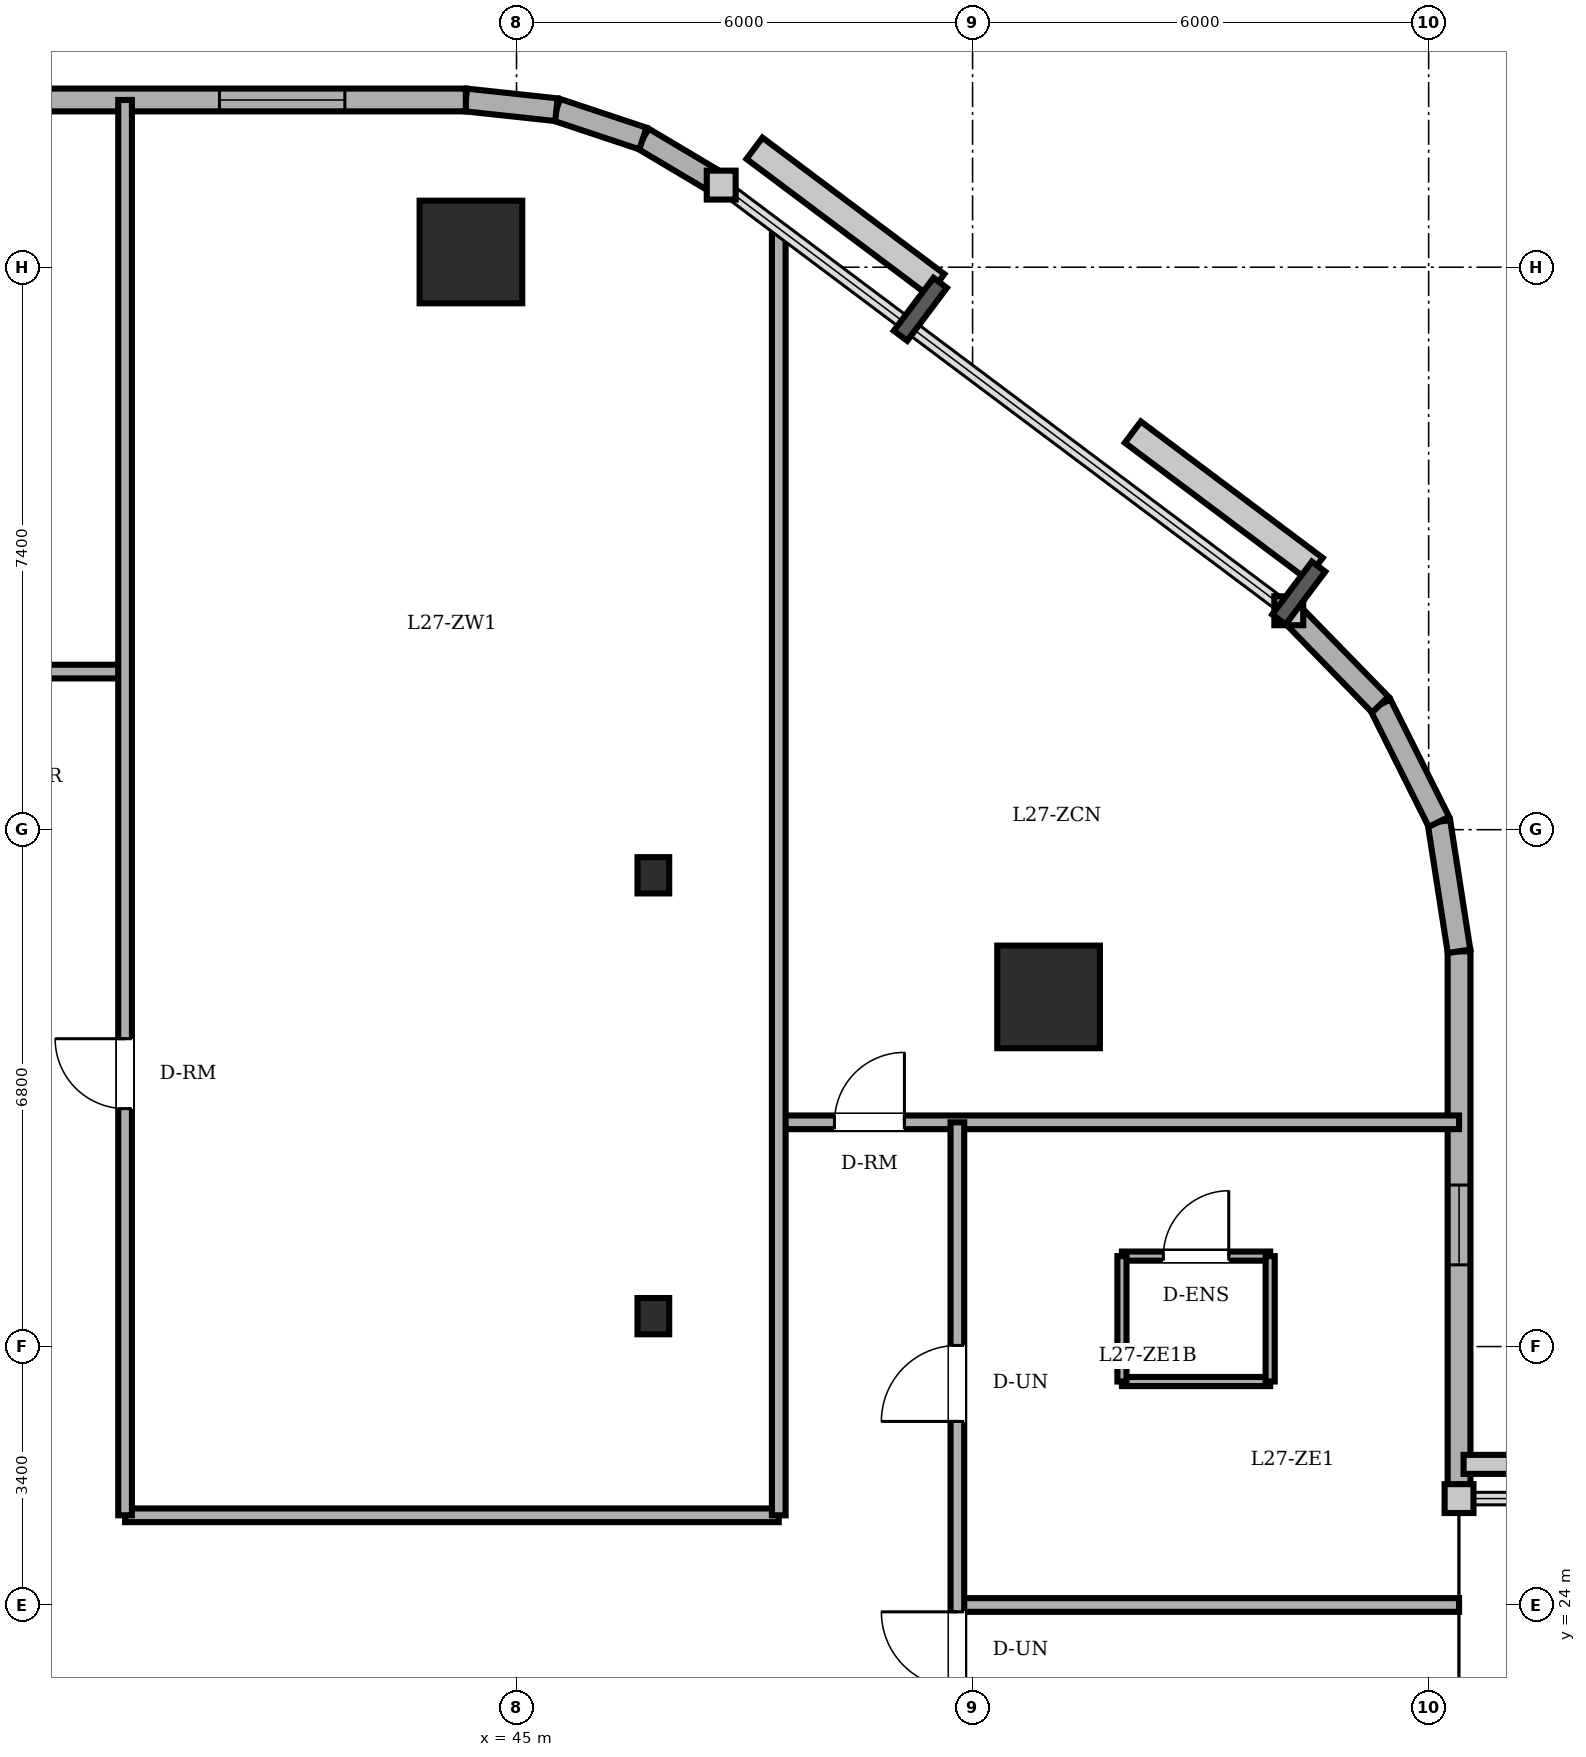
"""IFC4 building model, lengths in metres.
Left out: names, types, materials, properties, quantities, classifications, styles, units other than length and angle.
Written with IfcOpenShell. Run it as: python <this file> out.ifc"""

import sys

from ifc_helpers import new_model, si_unit, direction, frame, frame_2d, origin, origin_2d, place, context, subcontext, project, spatial, rectangle, circle, i_section, extrude, element, fill, save


model = new_model("IFC4")
c1 = context("Model", 3, precision=1e-05, world=origin(), true_north=direction((0.0, 1.0)))
c2 = subcontext(c1, "Body", "Model", "MODEL_VIEW")
j1 = project(units=[si_unit("LENGTHUNIT", "METRE"), si_unit("PLANEANGLEUNIT", "RADIAN")], contexts=[c1])
p1 = place(None, origin())
s1 = spatial("IfcSite", under=j1, at=p1, CompositionType="ELEMENT")
p2 = place(p1, origin())
s2 = spatial("IfcBuilding", under=s1, at=p2, CompositionType="ELEMENT")
p3 = place(p2, frame((0.0, 0.0, 104.3)))
s3 = spatial("IfcBuildingStorey", under=s2, at=p3, CompositionType="ELEMENT", Elevation=104.3)
for number, where, z_axis, x_axis in (
    (1, (52.0, 32.0, 0.0), (0.0, 0.0, 1.0), (1.0, 0.0, 0.0)),
    (2, (44.4, 41.8, 0.0), (0.0, 0.0, 1.0), (1.0, 0.0, 0.0)),
):
    element("IfcColumn", number, at=place(p3, frame(where, z_axis=z_axis, x_axis=x_axis)), inside=s3, PredefinedType="COLUMN", context=c2, shape_type="SweptSolid", body=[
        extrude(circle(Radius=0.675, at=origin_2d()), origin(), (0.0, 0.0, 1.0), 3.6),
    ])
for number, where, z_axis, x_axis in (
    (3, (46.8, 27.8, 0.0), (0.0, 0.0, 1.0), (1.0, 0.0, 0.0)),
    (4, (46.8, 33.6, 0.0), (0.0, 0.0, 1.0), (1.0, 0.0, 0.0)),
):
    element("IfcColumn", number, at=place(p3, frame(where, z_axis=z_axis, x_axis=x_axis)), inside=s3, PredefinedType="COLUMN", context=c2, shape_type="SweptSolid", body=[
        extrude(i_section(OverallWidth=0.417, OverallDepth=0.477, WebThickness=0.036, FlangeThickness=0.057, FilletRadius=0.015, at=origin_2d()), origin(), (0.0, 0.0, 1.0), 3.6),
    ])
p4 = place(p3, frame((57.4, 25.4, 0.0), z_axis=(0.0, 0.0, 1.0), x_axis=(0.0, 1.0, 0.0)))
e5 = element("IfcWall", 5, at=p4, inside=s3, PredefinedType="SOLIDWALL", context=c2, shape_type="SweptSolid", body=[
    extrude(rectangle(XDim=7.2, YDim=0.3, at=frame_2d((3.6, 0.0))), origin(), (0.0, 0.0, 1.0), 3.4),
])
p5 = place(p4, frame((3.075, 0.0, 0.85)))
e6 = element("IfcOpeningElement", 6, at=p5, cuts=e5, PredefinedType="OPENING", context=c2, shape_type="SweptSolid", body=[
    extrude(rectangle(XDim=1.05, YDim=1.55, at=frame_2d((0.525, 0.775))), frame((0.0, 0.16, 0.0), z_axis=(0.0, -1.0, 0.0), x_axis=(1.0, 0.0, 0.0)), (0.0, 0.0, 1.0), 0.32),
])
p6 = place(p3, frame((57.4, 32.6, 0.0), z_axis=(0.0, 0.0, 1.0), x_axis=(-0.153620989032, 0.988129845581, 0.0)))
e7 = element("IfcWall", 7, at=p6, inside=s3, PredefinedType="SOLIDWALL", context=c2, shape_type="SweptSolid", body=[
    extrude(rectangle(XDim=1.724, YDim=0.3, at=frame_2d((0.862, 0.0))), origin(), (0.0, 0.0, 1.0), 3.4),
])
for number, where, z_axis, x_axis in (
    (8, (57.135, 34.304, 0.0), (0.0, 0.0, 1.0), (-0.447, 0.894, 0.0)),
    (9, (56.364, 35.846, 0.0), (0.0, 0.0, 1.0), (-0.698, 0.716, 0.0)),
):
    element("IfcWall", number, at=place(p3, frame(where, z_axis=z_axis, x_axis=x_axis)), inside=s3, PredefinedType="SOLIDWALL", context=c2, shape_type="SweptSolid", body=[
        extrude(rectangle(XDim=1.724, YDim=0.3, at=frame_2d((0.862, 0.0))), origin(), (0.0, 0.0, 1.0), 3.4),
    ])
p7 = place(p3, frame((47.693, 42.68, 0.0), z_axis=(0.0, 0.0, 1.0), x_axis=(-0.859320591642, 0.511437308749, 0.0)))
e10 = element("IfcWall", 10, at=p7, inside=s3, PredefinedType="SOLIDWALL", context=c2, shape_type="SweptSolid", body=[
    extrude(rectangle(XDim=1.199, YDim=0.3, at=frame_2d((0.599, 0.0))), origin(), (0.0, 0.0, 1.0), 3.4),
])
p8 = place(p3, frame((46.663, 43.293, 0.0), z_axis=(0.0, 0.0, 1.0), x_axis=(-0.948744332129, 0.316044604847, 0.0)))
e11 = element("IfcWall", 11, at=p8, inside=s3, PredefinedType="SOLIDWALL", context=c2, shape_type="SweptSolid", body=[
    extrude(rectangle(XDim=1.2, YDim=0.3, at=frame_2d((0.6, 0.0))), origin(), (0.0, 0.0, 1.0), 3.4),
])
p9 = place(p3, frame((45.525, 43.672, 0.0), z_axis=(0.0, 0.0, 1.0), x_axis=(-0.994289103787, 0.106720092254, 0.0)))
e12 = element("IfcWall", 12, at=p9, inside=s3, PredefinedType="SOLIDWALL", context=c2, shape_type="SweptSolid", body=[
    extrude(rectangle(XDim=1.199, YDim=0.3, at=frame_2d((0.599, 0.0))), origin(), (0.0, 0.0, 1.0), 3.4),
])
p10 = place(p3, frame((44.333, 43.8, 0.0), z_axis=(0.0, 0.0, 1.0), x_axis=(-1.0, 0.0, 0.0)))
e13 = element("IfcWall", 13, at=p10, inside=s3, PredefinedType="SOLIDWALL", context=c2, shape_type="SweptSolid", body=[
    extrude(rectangle(XDim=29.933, YDim=0.3, at=frame_2d((14.967, 0.0))), origin(), (0.0, 0.0, 1.0), 3.4),
])
p11 = place(p10, frame((18.358, 0.0, 0.0)))
e14 = element("IfcOpeningElement", 14, at=p11, cuts=e13, PredefinedType="OPENING", context=c2, shape_type="SweptSolid", body=[
    extrude(rectangle(XDim=0.95, YDim=2.2, at=frame_2d((0.475, 1.1))), frame((0.0, 0.16, 0.0), z_axis=(0.0, -1.0, 0.0), x_axis=(1.0, 0.0, 0.0)), (0.0, 0.0, 1.0), 0.32),
])
p12 = place(p10, frame((1.591, 0.0, 0.85)))
e15 = element("IfcOpeningElement", 15, at=p12, cuts=e13, PredefinedType="OPENING", context=c2, shape_type="SweptSolid", body=[
    extrude(rectangle(XDim=1.65, YDim=1.55, at=frame_2d((0.825, 0.775))), frame((0.0, 0.16, 0.0), z_axis=(0.0, -1.0, 0.0), x_axis=(1.0, 0.0, 0.0)), (0.0, 0.0, 1.0), 0.32),
])
p13 = place(p10, frame((6.808, 0.0, 0.85)))
e16 = element("IfcOpeningElement", 16, at=p13, cuts=e13, PredefinedType="OPENING", context=c2, shape_type="SweptSolid", body=[
    extrude(rectangle(XDim=1.65, YDim=1.55, at=frame_2d((0.825, 0.775))), frame((0.0, 0.16, 0.0), z_axis=(0.0, -1.0, 0.0), x_axis=(1.0, 0.0, 0.0)), (0.0, 0.0, 1.0), 0.32),
])
p14 = place(p10, frame((9.958, 0.0, 0.85)))
e17 = element("IfcOpeningElement", 17, at=p14, cuts=e13, PredefinedType="OPENING", context=c2, shape_type="SweptSolid", body=[
    extrude(rectangle(XDim=1.65, YDim=1.55, at=frame_2d((0.825, 0.775))), frame((0.0, 0.16, 0.0), z_axis=(0.0, -1.0, 0.0), x_axis=(1.0, 0.0, 0.0)), (0.0, 0.0, 1.0), 0.32),
])
p15 = place(p10, frame((15.508, 0.0, 0.85)))
e18 = element("IfcOpeningElement", 18, at=p15, cuts=e13, PredefinedType="OPENING", context=c2, shape_type="SweptSolid", body=[
    extrude(rectangle(XDim=1.65, YDim=1.55, at=frame_2d((0.825, 0.775))), frame((0.0, 0.16, 0.0), z_axis=(0.0, -1.0, 0.0), x_axis=(1.0, 0.0, 0.0)), (0.0, 0.0, 1.0), 0.32),
])
p16 = place(p10, frame((23.125, 0.0, 0.85)))
e19 = element("IfcOpeningElement", 19, at=p16, cuts=e13, PredefinedType="OPENING", context=c2, shape_type="SweptSolid", body=[
    extrude(rectangle(XDim=1.65, YDim=1.55, at=frame_2d((0.825, 0.775))), frame((0.0, 0.16, 0.0), z_axis=(0.0, -1.0, 0.0), x_axis=(1.0, 0.0, 0.0)), (0.0, 0.0, 1.0), 0.32),
])
p17 = place(p10, frame((25.941, 0.0, 0.85)))
e20 = element("IfcOpeningElement", 20, at=p17, cuts=e13, PredefinedType="OPENING", context=c2, shape_type="SweptSolid", body=[
    extrude(rectangle(XDim=1.65, YDim=1.55, at=frame_2d((0.825, 0.775))), frame((0.0, 0.16, 0.0), z_axis=(0.0, -1.0, 0.0), x_axis=(1.0, 0.0, 0.0)), (0.0, 0.0, 1.0), 0.32),
])
p18 = place(p3, frame((52.965, 28.59, 0.0), z_axis=(0.0, 0.0, 1.0), x_axis=(1.0, 0.0, 0.0)))
e21 = element("IfcWall", 21, at=p18, inside=s3, PredefinedType="PARTITIONING", context=c2, shape_type="SweptSolid", body=[
    extrude(rectangle(XDim=1.95, YDim=0.12, at=frame_2d((0.975, 0.0))), origin(), (0.0, 0.0, 1.0), 3.4),
])
p19 = place(p18, frame((0.545, 0.0, 0.0)))
e22 = element("IfcOpeningElement", 22, at=p19, cuts=e21, PredefinedType="OPENING", context=c2, shape_type="SweptSolid", body=[
    extrude(rectangle(XDim=0.86, YDim=2.1, at=frame_2d((0.43, 1.05))), frame((0.0, 0.07, 0.0), z_axis=(0.0, -1.0, 0.0), x_axis=(1.0, 0.0, 0.0)), (0.0, 0.0, 1.0), 0.14),
])
p20 = place(p3, frame((54.915, 26.94, 0.0), z_axis=(0.0, 0.0, 1.0), x_axis=(-1.0, 0.0, 0.0)))
e23 = element("IfcWall", 23, at=p20, inside=s3, PredefinedType="PARTITIONING", context=c2, shape_type="SweptSolid", body=[
    extrude(rectangle(XDim=1.95, YDim=0.12, at=frame_2d((0.975, 0.0))), origin(), (0.0, 0.0, 1.0), 3.4),
])
for number, where, z_axis, x_axis in (
    (24, (52.965, 28.59, 0.0), (0.0, 0.0, 1.0), (0.0, -1.0, 0.0)),
    (25, (54.915, 26.94, 0.0), (0.0, 0.0, 1.0), (0.0, 1.0, 0.0)),
):
    element("IfcWall", number, at=place(p3, frame(where, z_axis=z_axis, x_axis=x_axis)), inside=s3, PredefinedType="PARTITIONING", context=c2, shape_type="SweptSolid", body=[
        extrude(rectangle(XDim=1.65, YDim=0.12, at=frame_2d((0.825, 0.0))), origin(), (0.0, 0.0, 1.0), 3.4),
    ])
p21 = place(p3, frame((50.8, 24.0, 0.0), z_axis=(0.0, 0.0, 1.0), x_axis=(1.0, 0.0, 0.0)))
e26 = element("IfcWall", 26, at=p21, inside=s3, PredefinedType="PARTITIONING", context=c2, shape_type="SweptSolid", body=[
    extrude(rectangle(XDim=6.6, YDim=0.18, at=frame_2d((3.3, 0.0))), origin(), (0.0, 0.0, 1.0), 3.022),
])
p22 = place(p3, frame((39.85, 25.18, 0.0), z_axis=(0.0, 0.0, 1.0), x_axis=(1.0, 0.0, 0.0)))
e27 = element("IfcWall", 27, at=p22, inside=s3, PredefinedType="PARTITIONING", context=c2, shape_type="SweptSolid", body=[
    extrude(rectangle(XDim=8.6, YDim=0.18, at=frame_2d((4.3, 0.0))), origin(), (0.0, 0.0, 1.0), 3.4),
])
p23 = place(p3, frame((48.45, 30.35, 0.0), z_axis=(0.0, 0.0, 1.0), x_axis=(1.0, 0.0, 0.0)))
e28 = element("IfcWall", 28, at=p23, inside=s3, PredefinedType="PARTITIONING", context=c2, shape_type="SweptSolid", body=[
    extrude(rectangle(XDim=8.95, YDim=0.18, at=frame_2d((4.475, 0.0))), origin(), (0.0, 0.0, 1.0), 3.4),
])
p24 = place(p23, frame((0.733, 0.0, 0.0)))
e29 = element("IfcOpeningElement", 29, at=p24, cuts=e28, PredefinedType="OPENING", context=c2, shape_type="SweptSolid", body=[
    extrude(rectangle(XDim=0.92, YDim=2.1, at=frame_2d((0.46, 1.05))), frame((0.0, 0.1, 0.0), z_axis=(0.0, -1.0, 0.0), x_axis=(1.0, 0.0, 0.0)), (0.0, 0.0, 1.0), 0.2),
])
p25 = place(p3, frame((8.8, 36.28, 0.0), z_axis=(0.0, 0.0, 1.0), x_axis=(1.0, 0.0, 0.0)))
e30 = element("IfcWall", 30, at=p25, inside=s3, PredefinedType="PARTITIONING", context=c2, shape_type="SweptSolid", body=[
    extrude(rectangle(XDim=31.05, YDim=0.18, at=frame_2d((15.525, 0.0))), origin(), (0.0, 0.0, 1.0), 3.4),
])
p26 = place(p25, frame((15.65, 0.0, 0.0)))
e31 = element("IfcOpeningElement", 31, at=p26, cuts=e30, PredefinedType="OPENING", context=c2, shape_type="SweptSolid", body=[
    extrude(rectangle(XDim=0.9, YDim=2.1, at=frame_2d((0.45, 1.05))), frame((0.0, 0.1, 0.0), z_axis=(0.0, -1.0, 0.0), x_axis=(1.0, 0.0, 0.0)), (0.0, 0.0, 1.0), 0.2),
])
p27 = place(p25, frame((19.27, 0.0, 0.0)))
e32 = element("IfcOpeningElement", 32, at=p27, cuts=e30, PredefinedType="OPENING", context=c2, shape_type="SweptSolid", body=[
    extrude(rectangle(XDim=0.86, YDim=2.1, at=frame_2d((0.43, 1.05))), frame((0.0, 0.1, 0.0), z_axis=(0.0, -1.0, 0.0), x_axis=(1.0, 0.0, 0.0)), (0.0, 0.0, 1.0), 0.2),
])
p28 = place(p25, frame((7.3, 0.0, 0.0)))
e33 = element("IfcOpeningElement", 33, at=p28, cuts=e30, PredefinedType="OPENING", context=c2, shape_type="SweptSolid", body=[
    extrude(rectangle(XDim=1.0, YDim=2.15, at=frame_2d((0.5, 1.075))), frame((0.0, 0.1, 0.0), z_axis=(0.0, -1.0, 0.0), x_axis=(1.0, 0.0, 0.0)), (0.0, 0.0, 1.0), 0.2),
])
p29 = place(p25, frame((25.605, 0.0, 0.0)))
e34 = element("IfcOpeningElement", 34, at=p29, cuts=e30, PredefinedType="OPENING", context=c2, shape_type="SweptSolid", body=[
    extrude(rectangle(XDim=0.92, YDim=2.1, at=frame_2d((0.46, 1.05))), frame((0.0, 0.1, 0.0), z_axis=(0.0, -1.0, 0.0), x_axis=(1.0, 0.0, 0.0)), (0.0, 0.0, 1.0), 0.2),
])
p30 = place(p3, frame((39.85, 25.18, 0.0), z_axis=(0.0, 0.0, 1.0), x_axis=(0.0, 1.0, 0.0)))
e35 = element("IfcWall", 35, at=p30, inside=s3, PredefinedType="PARTITIONING", context=c2, shape_type="SweptSolid", body=[
    extrude(rectangle(XDim=18.62, YDim=0.18, at=frame_2d((9.31, 0.0))), origin(), (0.0, 0.0, 1.0), 3.4),
])
p31 = place(p30, frame((5.35, 0.0, 0.0)))
e36 = element("IfcOpeningElement", 36, at=p31, cuts=e35, PredefinedType="OPENING", context=c2, shape_type="SweptSolid", body=[
    extrude(rectangle(XDim=0.92, YDim=2.1, at=frame_2d((0.46, 1.05))), frame((0.0, 0.1, 0.0), z_axis=(0.0, -1.0, 0.0), x_axis=(1.0, 0.0, 0.0)), (0.0, 0.0, 1.0), 0.2),
])
p32 = place(p3, frame((48.45, 25.18, 0.0), z_axis=(0.0, 0.0, 1.0), x_axis=(0.0, 1.0, 0.0)))
e37 = element("IfcWall", 37, at=p32, inside=s3, PredefinedType="PARTITIONING", context=c2, shape_type="SweptSolid", body=[
    extrude(rectangle(XDim=16.932, YDim=0.18, at=frame_2d((8.466, 0.0))), origin(), (0.0, 0.0, 1.0), 3.4),
])
p33 = place(p3, frame((50.8, 7.65, 0.0), z_axis=(0.0, 0.0, 1.0), x_axis=(0.0, 1.0, 0.0)))
e38 = element("IfcWall", 38, at=p33, inside=s3, PredefinedType="PARTITIONING", context=c2, shape_type="SweptSolid", body=[
    extrude(rectangle(XDim=22.7, YDim=0.18, at=frame_2d((11.35, 0.0))), origin(), (0.0, 0.0, 1.0), 3.4),
])
p34 = place(p33, frame((18.765, 0.0, 0.0)))
e39 = element("IfcOpeningElement", 39, at=p34, cuts=e38, PredefinedType="OPENING", context=c2, shape_type="SweptSolid", body=[
    extrude(rectangle(XDim=1.0, YDim=2.15, at=frame_2d((0.5, 1.075))), frame((0.0, 0.1, 0.0), z_axis=(0.0, -1.0, 0.0), x_axis=(1.0, 0.0, 0.0)), (0.0, 0.0, 1.0), 0.2),
])
p35 = place(p33, frame((15.26, 0.0, 0.0)))
e40 = element("IfcOpeningElement", 40, at=p35, cuts=e38, PredefinedType="OPENING", context=c2, shape_type="SweptSolid", body=[
    extrude(rectangle(XDim=1.0, YDim=2.15, at=frame_2d((0.5, 1.075))), frame((0.0, 0.1, 0.0), z_axis=(0.0, -1.0, 0.0), x_axis=(1.0, 0.0, 0.0)), (0.0, 0.0, 1.0), 0.2),
])
p36 = place(p5, origin())
e41 = element("IfcWindow", 41, at=p36, inside=s3, PartitioningType="SINGLE_PANEL", PredefinedType="WINDOW", context=c2, shape_type="SweptSolid", body=[
    extrude(rectangle(XDim=1.05, YDim=1.55, at=frame_2d((0.525, 0.775))), frame((0.0, 0.03, 0.0), z_axis=(0.0, -1.0, 0.0), x_axis=(1.0, 0.0, 0.0)), (0.0, 0.0, 1.0), 0.06),
])
fill(e6, e41)
p37 = place(p12, origin())
e42 = element("IfcWindow", 42, at=p37, inside=s3, PartitioningType="DOUBLE_PANEL_VERTICAL", PredefinedType="WINDOW", context=c2, shape_type="SweptSolid", body=[
    extrude(rectangle(XDim=1.65, YDim=1.55, at=frame_2d((0.825, 0.775))), frame((0.0, 0.03, 0.0), z_axis=(0.0, -1.0, 0.0), x_axis=(1.0, 0.0, 0.0)), (0.0, 0.0, 1.0), 0.06),
])
fill(e15, e42)
p38 = place(p19, origin())
e43 = element("IfcDoor", 43, at=p38, inside=s3, OperationType="SINGLE_SWING_RIGHT", PredefinedType="DOOR", context=c2, shape_type="SweptSolid", body=[
    extrude(rectangle(XDim=0.86, YDim=2.1, at=frame_2d((0.43, 1.05))), frame((0.0, 0.025, 0.0), z_axis=(0.0, -1.0, 0.0), x_axis=(1.0, 0.0, 0.0)), (0.0, 0.0, 1.0), 0.05),
])
fill(e22, e43)
p39 = place(p31, origin())
e44 = element("IfcDoor", 44, at=p39, inside=s3, OperationType="SINGLE_SWING_RIGHT", PredefinedType="DOOR", context=c2, shape_type="SweptSolid", body=[
    extrude(rectangle(XDim=0.92, YDim=2.1, at=frame_2d((0.46, 1.05))), frame((0.0, 0.025, 0.0), z_axis=(0.0, -1.0, 0.0), x_axis=(1.0, 0.0, 0.0)), (0.0, 0.0, 1.0), 0.05),
])
fill(e36, e44)
p40 = place(p24, origin())
e45 = element("IfcDoor", 45, at=p40, inside=s3, OperationType="SINGLE_SWING_RIGHT", PredefinedType="DOOR", context=c2, shape_type="SweptSolid", body=[
    extrude(rectangle(XDim=0.92, YDim=2.1, at=frame_2d((0.46, 1.05))), frame((0.0, 0.025, 0.0), z_axis=(0.0, -1.0, 0.0), x_axis=(1.0, 0.0, 0.0)), (0.0, 0.0, 1.0), 0.05),
])
fill(e29, e45)
p41 = place(p34, origin())
e46 = element("IfcDoor", 46, at=p41, inside=s3, OperationType="SINGLE_SWING_LEFT", PredefinedType="DOOR", context=c2, shape_type="SweptSolid", body=[
    extrude(rectangle(XDim=1.0, YDim=2.15, at=frame_2d((0.5, 1.075))), frame((0.0, 0.025, 0.0), z_axis=(0.0, -1.0, 0.0), x_axis=(1.0, 0.0, 0.0)), (0.0, 0.0, 1.0), 0.05),
])
fill(e39, e46)
p42 = place(p35, origin())
e47 = element("IfcDoor", 47, at=p42, inside=s3, OperationType="SINGLE_SWING_RIGHT", PredefinedType="DOOR", context=c2, shape_type="SweptSolid", body=[
    extrude(rectangle(XDim=1.0, YDim=2.15, at=frame_2d((0.5, 1.075))), frame((0.0, 0.025, 0.0), z_axis=(0.0, -1.0, 0.0), x_axis=(1.0, 0.0, 0.0)), (0.0, 0.0, 1.0), 0.05),
])
fill(e40, e47)
save(model, sys.argv[1])
